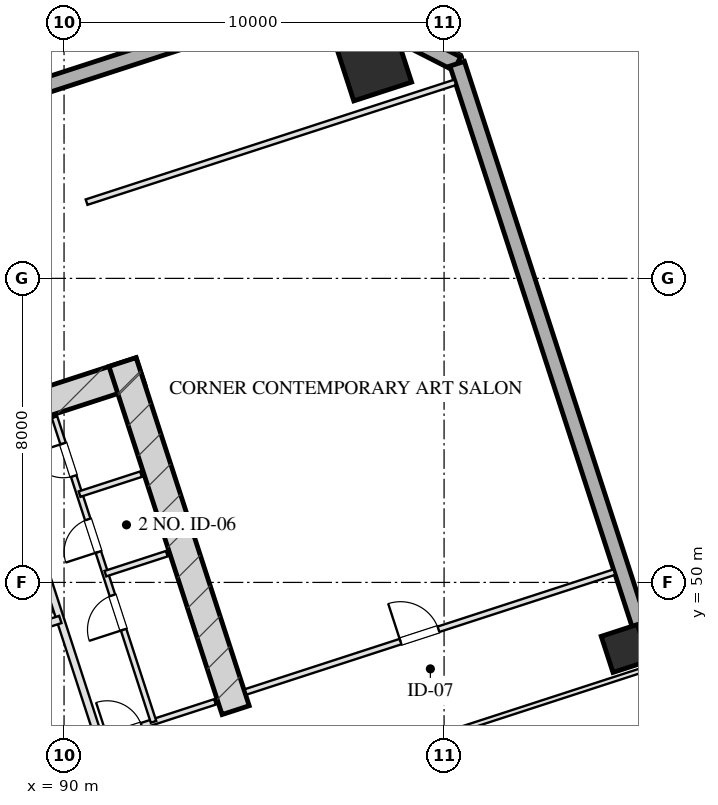
"""IFC4 building model, lengths in metres.
Left out: names, types, materials, properties, quantities, classifications, styles, units other than length and angle.
Written with IfcOpenShell. Run it as: python <this file> out.ifc"""

import sys

from ifc_helpers import new_model, si_unit, direction, frame, frame_2d, origin, origin_2d, place, context, subcontext, project, spatial, rectangle, hollow_rectangle, extrude, element, fill, save


model = new_model("IFC4")
c1 = context("Model", 3, precision=1e-05, world=origin(), true_north=direction((0.0, 1.0)))
c2 = subcontext(c1, "Body", "Model", "MODEL_VIEW")
j1 = project(units=[si_unit("LENGTHUNIT", "METRE"), si_unit("PLANEANGLEUNIT", "RADIAN")], contexts=[c1])
p1 = place(None, origin())
s1 = spatial("IfcSite", under=j1, at=p1, CompositionType="ELEMENT")
p2 = place(p1, origin())
s2 = spatial("IfcBuilding", under=s1, at=p2, CompositionType="ELEMENT")
p3 = place(p2, frame((0.0, 0.0, 60.95)))
s3 = spatial("IfcBuildingStorey", under=s2, at=p3, CompositionType="ELEMENT", Elevation=60.95)
p4 = place(p3, frame((76.272, 50.443, 0.0), z_axis=(0.0, 0.0, 1.0), x_axis=(0.951056072937, 0.309018358888, 0.0)))
e1 = element("IfcWall", 1, at=p4, inside=s3, PredefinedType="SHEAR", context=c2, shape_type="SweptSolid", body=[
    extrude(rectangle(XDim=16.55, YDim=0.75, at=frame_2d((8.275, 0.0))), origin(), (0.0, 0.0, 1.0), 3.45),
])
p5 = place(p3, frame((94.515, 46.639, 0.0), z_axis=(0.0, 0.0, 1.0), x_axis=(-0.309016134813, 0.951056795583, 0.0)))
e2 = element("IfcWall", 2, at=p5, inside=s3, PredefinedType="SHEAR", context=c2, shape_type="SweptSolid", body=[
    extrude(rectangle(XDim=9.63, YDim=0.75, at=frame_2d((4.815, 0.0))), origin(), (0.0, 0.0, 1.0), 3.45),
])
p6 = place(p3, frame((98.137, 63.677, 0.0), z_axis=(0.0, 0.0, 1.0), x_axis=(0.951056516295, 0.309016994375, 0.0)))
e3 = element("IfcColumn", 3, at=p6, inside=s3, PredefinedType="COLUMN", context=c2, shape_type="SweptSolid", body=[
    extrude(hollow_rectangle(XDim=1.6, YDim=1.6, WallThickness=0.055, at=origin_2d()), origin(), (0.0, 0.0, 1.0), 3.451),
])
p7 = place(p3, frame((104.766, 48.261, 0.0), z_axis=(0.0, 0.0, 1.0), x_axis=(0.951056516295, 0.309016994375, 0.0)))
e4 = element("IfcColumn", 4, at=p7, inside=s3, PredefinedType="COLUMN", context=c2, shape_type="SweptSolid", body=[
    extrude(hollow_rectangle(XDim=1.0, YDim=1.0, WallThickness=0.036, at=origin_2d()), origin(), (0.0, 0.0, 1.0), 3.451),
])
p8 = place(p3, frame((66.002, 55.433, 0.0), z_axis=(0.0, 0.0, 1.0), x_axis=(0.951055939317, 0.309018770125, 0.0)))
e5 = element("IfcWall", 5, at=p8, inside=s3, PredefinedType="SOLIDWALL", context=c2, shape_type="SweptSolid", body=[
    extrude(rectangle(XDim=32.4, YDim=0.4, at=frame_2d((16.2, 0.0))), origin(), (0.0, 0.0, 1.0), 2.61),
])
p9 = place(p3, frame((96.816, 65.446, 0.0), z_axis=(0.0, 0.0, 1.0), x_axis=(0.890998089617, -0.454007053137, 0.0)))
e6 = element("IfcWall", 6, at=p9, inside=s3, PredefinedType="SOLIDWALL", context=c2, shape_type="SweptSolid", body=[
    extrude(rectangle(XDim=3.96, YDim=0.4, at=frame_2d((1.98, 0.0))), origin(), (0.0, 0.0, 1.0), 2.61),
])
p10 = place(p3, frame((100.345, 63.648, 0.0), z_axis=(0.0, 0.0, 1.0), x_axis=(0.309014526607, -0.951057318118, 0.0)))
e7 = element("IfcWall", 7, at=p10, inside=s3, PredefinedType="SOLIDWALL", context=c2, shape_type="SweptSolid", body=[
    extrude(rectangle(XDim=50.0, YDim=0.4, at=frame_2d((25.0, 0.0))), origin(), (0.0, 0.0, 1.0), 2.61),
])
p11 = place(p10, frame((27.55, 0.0, 0.0)))
e8 = element("IfcOpeningElement", 8, at=p11, cuts=e7, PredefinedType="OPENING", context=c2, shape_type="SweptSolid", body=[
    extrude(rectangle(XDim=1.1, YDim=2.15, at=frame_2d((0.55, 1.075))), frame((0.0, 0.21, 0.0), z_axis=(0.0, -1.0, 0.0), x_axis=(1.0, 0.0, 0.0)), (0.0, 0.0, 1.0), 0.42),
])
p12 = place(p3, frame((90.928, 45.868, 0.0), z_axis=(0.0, 0.0, 1.0), x_axis=(-0.309042196757, 0.951048327176, 0.0)))
e9 = element("IfcWall", 9, at=p12, inside=s3, PredefinedType="PARTITIONING", context=c2, shape_type="SweptSolid", body=[
    extrude(rectangle(XDim=8.43, YDim=0.2, at=frame_2d((4.215, 0.0))), origin(), (0.0, 0.0, 1.0), 3.175),
])
p13 = place(p3, frame((85.718, 47.666, 0.0), z_axis=(0.0, 0.0, 1.0), x_axis=(0.951058531764, 0.30901079133, 0.0)))
e10 = element("IfcWall", 10, at=p13, inside=s3, PredefinedType="PARTITIONING", context=c2, shape_type="SweptSolid", body=[
    extrude(rectangle(XDim=4.4, YDim=0.2, at=frame_2d((2.2, 0.0))), origin(), (0.0, 0.0, 1.0), 3.175),
])
p14 = place(p13, frame((0.45, 0.0, 0.0)))
e11 = element("IfcOpeningElement", 11, at=p14, cuts=e10, PredefinedType="OPENING", context=c2, shape_type="SweptSolid", body=[
    extrude(rectangle(XDim=1.1, YDim=2.05, at=frame_2d((0.55, 1.025))), frame((0.0, 0.11, 0.0), z_axis=(0.0, -1.0, 0.0), x_axis=(1.0, 0.0, 0.0)), (0.0, 0.0, 1.0), 0.22),
])
p15 = place(p13, frame((2.55, 0.0, 0.0)))
e12 = element("IfcOpeningElement", 12, at=p15, cuts=e10, PredefinedType="OPENING", context=c2, shape_type="SweptSolid", body=[
    extrude(rectangle(XDim=1.1, YDim=2.05, at=frame_2d((0.55, 1.025))), frame((0.0, 0.11, 0.0), z_axis=(0.0, -1.0, 0.0), x_axis=(1.0, 0.0, 0.0)), (0.0, 0.0, 1.0), 0.22),
])
p16 = place(p3, frame((90.928, 45.868, 0.0), z_axis=(0.0, 0.0, 1.0), x_axis=(0.951059297078, 0.309008435874, 0.0)))
e13 = element("IfcWall", 13, at=p16, inside=s3, PredefinedType="PARTITIONING", context=c2, shape_type="SweptSolid", body=[
    extrude(rectangle(XDim=3.2, YDim=0.15, at=frame_2d((1.6, 0.0))), origin(), (0.0, 0.0, 1.0), 3.175),
])
p17 = place(p16, frame((0.22, 0.0, 0.0)))
e14 = element("IfcOpeningElement", 14, at=p17, cuts=e13, PredefinedType="OPENING", context=c2, shape_type="SweptSolid", body=[
    extrude(rectangle(XDim=0.95, YDim=2.05, at=frame_2d((0.475, 1.025))), frame((0.0, 0.085, 0.0), z_axis=(0.0, -1.0, 0.0), x_axis=(1.0, 0.0, 0.0)), (0.0, 0.0, 1.0), 0.17),
])
p18 = place(p3, frame((92.355, 46.331, 0.0), z_axis=(0.0, 0.0, 1.0), x_axis=(-0.309007490203, 0.951059604335, 0.0)))
e15 = element("IfcWall", 15, at=p18, inside=s3, PredefinedType="PARTITIONING", context=c2, shape_type="SweptSolid", body=[
    extrude(rectangle(XDim=8.43, YDim=0.15, at=frame_2d((4.215, 0.0))), origin(), (0.0, 0.0, 1.0), 3.175),
])
p19 = place(p18, frame((2.55, 0.0, 0.0)))
e16 = element("IfcOpeningElement", 16, at=p19, cuts=e15, PredefinedType="OPENING", context=c2, shape_type="SweptSolid", body=[
    extrude(rectangle(XDim=0.95, YDim=2.05, at=frame_2d((0.475, 1.025))), frame((0.0, 0.085, 0.0), z_axis=(0.0, -1.0, 0.0), x_axis=(1.0, 0.0, 0.0)), (0.0, 0.0, 1.0), 0.17),
])
p20 = place(p18, frame((4.7, 0.0, 0.0)))
e17 = element("IfcOpeningElement", 17, at=p20, cuts=e15, PredefinedType="OPENING", context=c2, shape_type="SweptSolid", body=[
    extrude(rectangle(XDim=0.9, YDim=2.05, at=frame_2d((0.45, 1.025))), frame((0.0, 0.085, 0.0), z_axis=(0.0, -1.0, 0.0), x_axis=(1.0, 0.0, 0.0)), (0.0, 0.0, 1.0), 0.17),
])
p21 = place(p18, frame((6.8, 0.0, 0.0)))
e18 = element("IfcOpeningElement", 18, at=p21, cuts=e15, PredefinedType="OPENING", context=c2, shape_type="SweptSolid", body=[
    extrude(rectangle(XDim=0.9, YDim=2.05, at=frame_2d((0.45, 1.025))), frame((0.0, 0.085, 0.0), z_axis=(0.0, -1.0, 0.0), x_axis=(1.0, 0.0, 0.0)), (0.0, 0.0, 1.0), 0.17),
])
p22 = place(p3, frame((91.088, 50.23, 0.0), z_axis=(0.0, 0.0, 1.0), x_axis=(0.951054116971, 0.309024378638, 0.0)))
e19 = element("IfcWall", 19, at=p22, inside=s3, PredefinedType="PARTITIONING", context=c2, shape_type="SweptSolid", body=[
    extrude(rectangle(XDim=1.7, YDim=0.15, at=frame_2d((0.85, 0.0))), origin(), (0.0, 0.0, 1.0), 3.175),
])
p23 = place(p3, frame((90.408, 52.323, 0.0), z_axis=(0.0, 0.0, 1.0), x_axis=(0.951040401051, 0.309066587596, 0.0)))
e20 = element("IfcWall", 20, at=p23, inside=s3, PredefinedType="PARTITIONING", context=c2, shape_type="SweptSolid", body=[
    extrude(rectangle(XDim=1.7, YDim=0.15, at=frame_2d((0.85, 0.0))), origin(), (0.0, 0.0, 1.0), 3.175),
])
p24 = place(p3, frame((90.593, 60.006, 0.0), z_axis=(0.0, 0.0, 1.0), x_axis=(0.951059043131, 0.309009217467, 0.0)))
e21 = element("IfcWall", 21, at=p24, inside=s3, PredefinedType="PARTITIONING", context=c2, shape_type="SweptSolid", body=[
    extrude(rectangle(XDim=10.2, YDim=0.15, at=frame_2d((5.1, 0.0))), origin(), (0.0, 0.0, 1.0), 3.175),
])
p25 = place(p3, frame((94.78, 47.119, 0.0), z_axis=(0.0, 0.0, 1.0), x_axis=(0.951054294345, 0.309023832749, 0.0)))
e22 = element("IfcWall", 22, at=p25, inside=s3, PredefinedType="PARTITIONING", context=c2, shape_type="SweptSolid", body=[
    extrude(rectangle(XDim=10.2, YDim=0.15, at=frame_2d((5.1, 0.0))), origin(), (0.0, 0.0, 1.0), 3.175),
])
p26 = place(p25, frame((4.284, 0.0, 0.0)))
e23 = element("IfcOpeningElement", 23, at=p26, cuts=e22, PredefinedType="OPENING", context=c2, shape_type="SweptSolid", body=[
    extrude(rectangle(XDim=1.05, YDim=2.05, at=frame_2d((0.525, 1.025))), frame((0.0, 0.085, 0.0), z_axis=(0.0, -1.0, 0.0), x_axis=(1.0, 0.0, 0.0)), (0.0, 0.0, 1.0), 0.17),
])
p27 = place(p3, frame((88.404, 42.229, 0.0), z_axis=(0.0, 0.0, 1.0), x_axis=(0.951054152931, 0.309024267966, 0.0)))
e24 = element("IfcWall", 24, at=p27, inside=s3, PredefinedType="PARTITIONING", context=c2, shape_type="SweptSolid", body=[
    extrude(rectangle(XDim=17.775, YDim=0.12, at=frame_2d((8.888, 0.0))), origin(), (0.0, 0.0, 1.0), 3.175),
])
p28 = place(p17, origin())
e25 = element("IfcDoor", 25, at=p28, inside=s3, OperationType="SINGLE_SWING_LEFT", PredefinedType="DOOR", context=c2, shape_type="SweptSolid", body=[
    extrude(rectangle(XDim=0.95, YDim=2.05, at=frame_2d((0.475, 1.025))), frame((0.0, 0.025, 0.0), z_axis=(0.0, -1.0, 0.0), x_axis=(1.0, 0.0, 0.0)), (0.0, 0.0, 1.0), 0.05),
])
fill(e14, e25)
p29 = place(p19, origin())
e26 = element("IfcDoor", 26, at=p29, inside=s3, OperationType="SINGLE_SWING_LEFT", PredefinedType="DOOR", context=c2, shape_type="SweptSolid", body=[
    extrude(rectangle(XDim=0.95, YDim=2.05, at=frame_2d((0.475, 1.025))), frame((0.0, 0.025, 0.0), z_axis=(0.0, -1.0, 0.0), x_axis=(1.0, 0.0, 0.0)), (0.0, 0.0, 1.0), 0.05),
])
fill(e16, e26)
p30 = place(p20, origin())
e27 = element("IfcDoor", 27, at=p30, inside=s3, OperationType="SINGLE_SWING_LEFT", PredefinedType="DOOR", context=c2, shape_type="SweptSolid", body=[
    extrude(rectangle(XDim=0.9, YDim=2.05, at=frame_2d((0.45, 1.025))), frame((0.0, 0.025, 0.0), z_axis=(0.0, -1.0, 0.0), x_axis=(1.0, 0.0, 0.0)), (0.0, 0.0, 1.0), 0.05),
])
fill(e17, e27)
p31 = place(p21, origin())
e28 = element("IfcDoor", 28, at=p31, inside=s3, OperationType="SINGLE_SWING_RIGHT", PredefinedType="DOOR", context=c2, shape_type="SweptSolid", body=[
    extrude(rectangle(XDim=0.9, YDim=2.05, at=frame_2d((0.45, 1.025))), frame((0.0, 0.025, 0.0), z_axis=(0.0, -1.0, 0.0), x_axis=(1.0, 0.0, 0.0)), (0.0, 0.0, 1.0), 0.05),
])
fill(e18, e28)
p32 = place(p26, origin())
e29 = element("IfcDoor", 29, at=p32, inside=s3, OperationType="SINGLE_SWING_LEFT", PredefinedType="DOOR", context=c2, shape_type="SweptSolid", body=[
    extrude(rectangle(XDim=1.05, YDim=2.05, at=frame_2d((0.525, 1.025))), frame((0.0, 0.025, 0.0), z_axis=(0.0, -1.0, 0.0), x_axis=(1.0, 0.0, 0.0)), (0.0, 0.0, 1.0), 0.05),
])
fill(e23, e29)
save(model, sys.argv[1])
